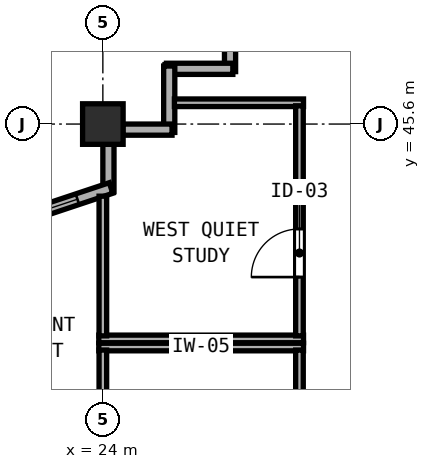
"""IFC4 building model, lengths in metres.
Left out: names, types, materials, properties, quantities, classifications, styles, units other than length and angle.
Written with IfcOpenShell. Run it as: python <this file> out.ifc"""

import sys

from ifc_helpers import new_model, si_unit, direction, frame, frame_2d, origin, origin_2d, place, context, subcontext, project, spatial, rectangle, hollow_rectangle, extrude, element, fill, save


model = new_model("IFC4")
c1 = context("Model", 3, precision=1e-05, world=origin(), true_north=direction((0.0, 1.0)))
c2 = subcontext(c1, "Body", "Model", "MODEL_VIEW")
j1 = project(units=[si_unit("LENGTHUNIT", "METRE"), si_unit("PLANEANGLEUNIT", "RADIAN")], contexts=[c1])
p1 = place(None, origin())
s1 = spatial("IfcSite", under=j1, at=p1, CompositionType="ELEMENT")
p2 = place(p1, origin())
s2 = spatial("IfcBuilding", under=s1, at=p2, CompositionType="ELEMENT")
p3 = place(p2, frame((0.0, 0.0, 254.45)))
s3 = spatial("IfcBuildingStorey", under=s2, at=p3, CompositionType="ELEMENT", Elevation=254.45)
p4 = place(p3, frame((24.0, 45.6, 0.0), z_axis=(0.0, 0.0, 1.0), x_axis=(1.0, 0.0, 0.0)))
e1 = element("IfcColumn", 1, at=p4, inside=s3, PredefinedType="COLUMN", context=c2, shape_type="SweptSolid", body=[
    extrude(hollow_rectangle(XDim=0.8, YDim=0.8, WallThickness=0.03, at=origin_2d()), origin(), (0.0, 0.0, 1.0), 3.85),
])
p5 = place(p3, frame((26.51, 48.0, 0.0), z_axis=(0.0, 0.0, 1.0), x_axis=(0.0, -1.0, 0.0)))
e2 = element("IfcWall", 2, at=p5, inside=s3, PredefinedType="SOLIDWALL", context=c2, shape_type="SweptSolid", body=[
    extrude(rectangle(XDim=1.365, YDim=0.22, at=frame_2d((0.683, 0.0))), origin(), (0.0, 0.0, 1.0), 3.67),
])
for number, where, z_axis, x_axis in (
    (3, (26.565, 46.69, 0.0), (0.0, 0.0, 1.0), (-1.0, 0.0, 0.0)),
    (4, (25.31, 46.745, 0.0), (0.0, 0.0, 1.0), (0.0, -1.0, 0.0)),
):
    element("IfcWall", number, at=place(p3, frame(where, z_axis=z_axis, x_axis=x_axis)), inside=s3, PredefinedType="SOLIDWALL", context=c2, shape_type="SweptSolid", body=[
        extrude(rectangle(XDim=1.31, YDim=0.22, at=frame_2d((0.655, 0.0))), origin(), (0.0, 0.0, 1.0), 3.67),
    ])
p6 = place(p3, frame((25.365, 45.49, 0.0), z_axis=(0.0, 0.0, 1.0), x_axis=(-1.0, 0.0, 0.0)))
e5 = element("IfcWall", 5, at=p6, inside=s3, PredefinedType="SOLIDWALL", context=c2, shape_type="SweptSolid", body=[
    extrude(rectangle(XDim=0.973, YDim=0.22, at=frame_2d((0.486, 0.0))), origin(), (0.0, 0.0, 1.0), 3.67),
])
p7 = place(p3, frame((24.11, 45.208, 0.0), z_axis=(0.0, 0.0, 1.0), x_axis=(0.0, -1.0, 0.0)))
e6 = element("IfcWall", 6, at=p7, inside=s3, PredefinedType="SOLIDWALL", context=c2, shape_type="SweptSolid", body=[
    extrude(rectangle(XDim=0.942, YDim=0.22, at=frame_2d((0.471, 0.0))), origin(), (0.0, 0.0, 1.0), 3.315),
])
p8 = place(p3, frame((24.162, 44.338, 0.0), z_axis=(0.0, 0.0, 1.0), x_axis=(-0.948687165594, -0.31621616315, 0.0)))
e7 = element("IfcWall", 7, at=p8, inside=s3, PredefinedType="SOLIDWALL", context=c2, shape_type="SweptSolid", body=[
    extrude(rectangle(XDim=6.312, YDim=0.22, at=frame_2d((3.156, 0.0))), origin(), (0.0, 0.0, 1.0), 3.315),
])
p9 = place(p8, frame((0.7, 0.0, 0.85)))
e8 = element("IfcOpeningElement", 8, at=p9, cuts=e7, PredefinedType="OPENING", context=c2, shape_type="SweptSolid", body=[
    extrude(rectangle(XDim=1.25, YDim=1.95, at=frame_2d((0.625, 0.975))), frame((0.0, 0.12, 0.0), z_axis=(0.0, -1.0, 0.0), x_axis=(1.0, 0.0, 0.0)), (0.0, 0.0, 1.0), 0.24),
])
p10 = place(p3, frame((23.92, 41.2, 0.0), z_axis=(0.0, 0.0, 1.0), x_axis=(1.0, 0.0, 0.0)))
e9 = element("IfcWall", 9, at=p10, inside=s3, PredefinedType="PARTITIONING", context=c2, shape_type="SweptSolid", body=[
    extrude(rectangle(XDim=4.04, YDim=0.15, at=frame_2d((2.02, 0.0))), origin(), (0.0, 0.0, 1.0), 3.67),
])
p11 = place(p3, frame((24.0, 33.06, 0.0), z_axis=(0.0, 0.0, 1.0), x_axis=(0.0, 1.0, 0.0)))
e10 = element("IfcWall", 10, at=p11, inside=s3, PredefinedType="PARTITIONING", context=c2, shape_type="SweptSolid", body=[
    extrude(rectangle(XDim=8.08, YDim=0.15, at=frame_2d((4.04, 0.0))), origin(), (0.0, 0.0, 1.0), 3.315),
])
p12 = place(p3, frame((27.88, 33.06, 0.0), z_axis=(0.0, 0.0, 1.0), x_axis=(0.0, 1.0, 0.0)))
e11 = element("IfcWall", 11, at=p12, inside=s3, PredefinedType="PARTITIONING", context=c2, shape_type="SweptSolid", body=[
    extrude(rectangle(XDim=8.08, YDim=0.15, at=frame_2d((4.04, 0.0))), origin(), (0.0, 0.0, 1.0), 3.67),
])
p13 = place(p12, frame((3.61, 0.0, 0.0), z_axis=(0.0, 0.0, 1.0), x_axis=(-1.0, 0.0, 0.0)))
e12 = element("IfcOpeningElement", 12, at=p13, cuts=e11, PredefinedType="OPENING", context=c2, shape_type="SweptSolid", body=[
    extrude(rectangle(XDim=0.95, YDim=2.12, at=frame_2d((0.475, 1.06))), frame((0.0, 0.085, 0.0), z_axis=(0.0, -1.0, 0.0), x_axis=(1.0, 0.0, 0.0)), (0.0, 0.0, 1.0), 0.17),
])
p14 = place(p3, frame((25.412, 46.02, 0.0), z_axis=(0.0, 0.0, 1.0), x_axis=(1.0, 0.0, 0.0)))
e13 = element("IfcWall", 13, at=p14, inside=s3, PredefinedType="PARTITIONING", context=c2, shape_type="SweptSolid", body=[
    extrude(rectangle(XDim=2.548, YDim=0.15, at=frame_2d((1.274, 0.0))), origin(), (0.0, 0.0, 1.0), 3.67),
])
p15 = place(p3, frame((23.92, 41.36, 0.0), z_axis=(0.0, 0.0, 1.0), x_axis=(1.0, 0.0, 0.0)))
e14 = element("IfcWall", 14, at=p15, inside=s3, PredefinedType="PARTITIONING", context=c2, shape_type="SweptSolid", body=[
    extrude(rectangle(XDim=4.04, YDim=0.15, at=frame_2d((2.02, 0.0))), origin(), (0.0, 0.0, 1.0), 3.67),
])
p16 = place(p3, frame((24.0, 41.42, 0.0), z_axis=(0.0, 0.0, 1.0), x_axis=(0.0, 1.0, 0.0)))
e15 = element("IfcWall", 15, at=p16, inside=s3, PredefinedType="PARTITIONING", context=c2, shape_type="SweptSolid", body=[
    extrude(rectangle(XDim=2.757, YDim=0.15, at=frame_2d((1.378, 0.0))), origin(), (0.0, 0.0, 1.0), 3.315),
])
p17 = place(p3, frame((27.88, 41.42, 0.0), z_axis=(0.0, 0.0, 1.0), x_axis=(0.0, 1.0, 0.0)))
e16 = element("IfcWall", 16, at=p17, inside=s3, PredefinedType="PARTITIONING", context=c2, shape_type="SweptSolid", body=[
    extrude(rectangle(XDim=4.54, YDim=0.15, at=frame_2d((2.27, 0.0))), origin(), (0.0, 0.0, 1.0), 3.67),
])
p18 = place(p17, frame((2.11, 0.0, 0.0), z_axis=(0.0, 0.0, 1.0), x_axis=(-1.0, 0.0, 0.0)))
e17 = element("IfcOpeningElement", 17, at=p18, cuts=e16, PredefinedType="OPENING", context=c2, shape_type="SweptSolid", body=[
    extrude(rectangle(XDim=0.95, YDim=2.12, at=frame_2d((0.475, 1.06))), frame((0.0, 0.085, 0.0), z_axis=(0.0, -1.0, 0.0), x_axis=(1.0, 0.0, 0.0)), (0.0, 0.0, 1.0), 0.17),
])
p19 = place(p9, origin())
e18 = element("IfcWindow", 18, at=p19, inside=s3, PartitioningType="SINGLE_PANEL", PredefinedType="WINDOW", context=c2, shape_type="SweptSolid", body=[
    extrude(rectangle(XDim=1.25, YDim=1.95, at=frame_2d((0.625, 0.975))), frame((0.0, 0.03, 0.0), z_axis=(0.0, -1.0, 0.0), x_axis=(1.0, 0.0, 0.0)), (0.0, 0.0, 1.0), 0.06),
])
fill(e8, e18)
p20 = place(p18, origin())
e19 = element("IfcDoor", 19, at=p20, inside=s3, OperationType="SINGLE_SWING_RIGHT", PredefinedType="DOOR", context=c2, shape_type="SweptSolid", body=[
    extrude(rectangle(XDim=0.95, YDim=2.12, at=frame_2d((0.475, 1.06))), frame((0.0, 0.025, 0.0), z_axis=(0.0, -1.0, 0.0), x_axis=(1.0, 0.0, 0.0)), (0.0, 0.0, 1.0), 0.05),
])
fill(e17, e19)
save(model, sys.argv[1])
